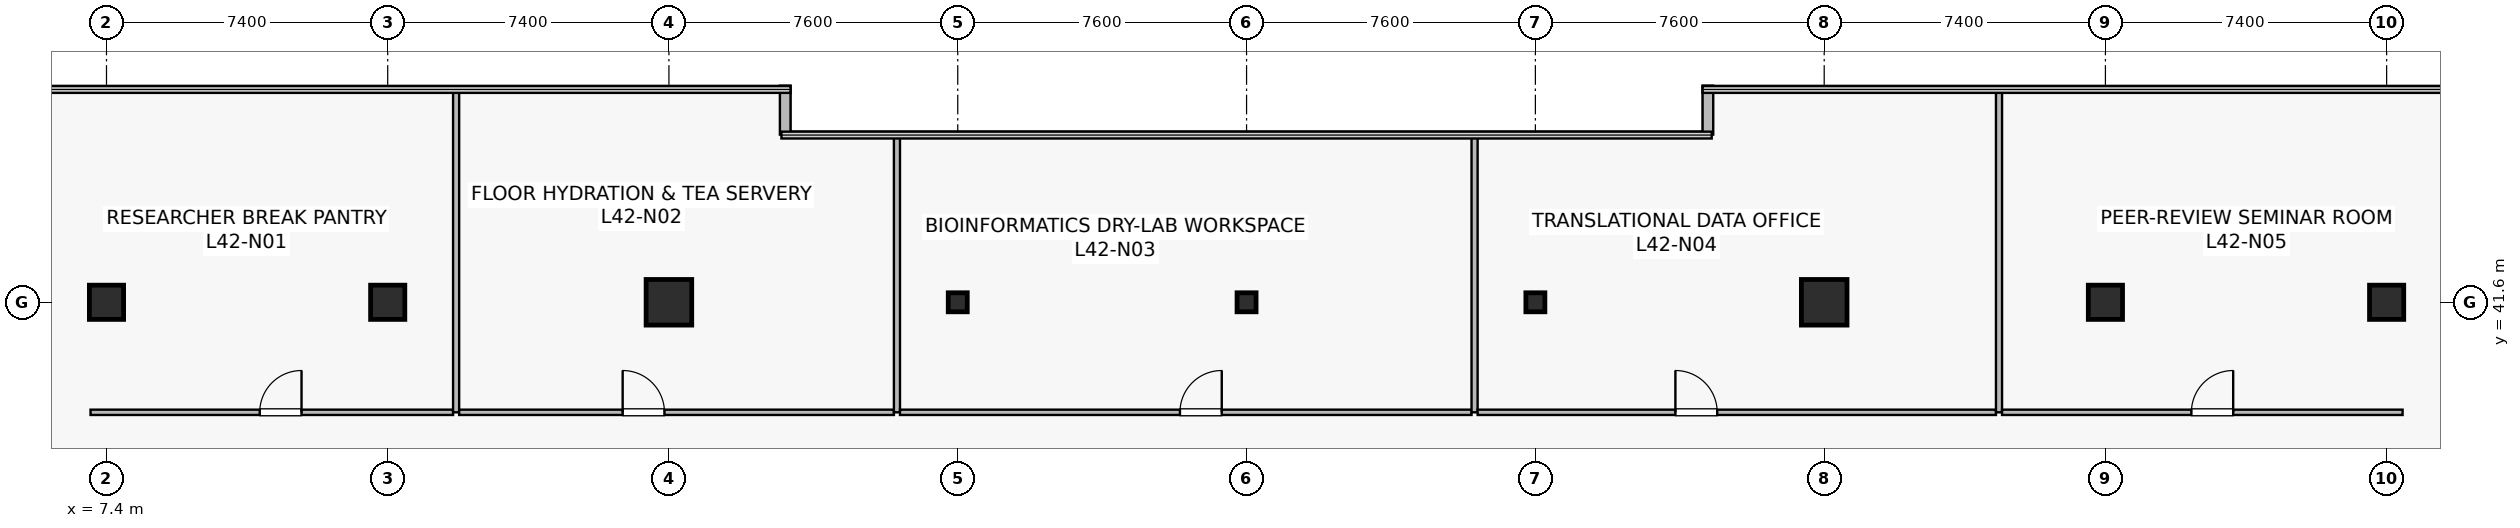
"""IFC4 building model, lengths in metres.
Left out: names, types, materials, properties, quantities, classifications, styles, units other than length and angle.
Written with IfcOpenShell. Run it as: python <this file> out.ifc"""

import sys

from ifc_helpers import new_model, si_unit, direction, frame, frame_2d, origin, origin_2d, place, context, subcontext, project, spatial, rectangle, hollow_rectangle, extrude, source, transform, mapped, element, fill, save


model = new_model("IFC4")
c1 = context("Model", 3, precision=1e-05, world=origin(), true_north=direction((0.0, 1.0)))
c2 = subcontext(c1, "Body", "Model", "MODEL_VIEW")
j1 = project(units=[si_unit("LENGTHUNIT", "METRE"), si_unit("PLANEANGLEUNIT", "RADIAN")], contexts=[c1])
p1 = place(None, origin())
s1 = spatial("IfcSite", under=j1, at=p1, CompositionType="ELEMENT")
p2 = place(p1, origin())
s2 = spatial("IfcBuilding", under=s1, at=p2, CompositionType="ELEMENT")
p3 = place(p2, frame((0.0, 0.0, 174.8)))
s3 = spatial("IfcBuildingStorey", under=s2, at=p3, CompositionType="ELEMENT", Elevation=174.8)
m1 = source(origin(), c2, "Body", "SweptSolid", [
    extrude(rectangle(XDim=0.9, YDim=0.9, at=origin_2d()), origin(), (0.0, 0.0, 1.0), 4.1),
])
p4 = place(p3, frame((14.8, 41.6, 0.0), z_axis=(0.0, 0.0, 1.0), x_axis=(1.0, 0.0, 0.0)))
e1 = element("IfcColumn", 1, at=p4, inside=s3, PredefinedType="COLUMN", context=c2, shape_type="MappedRepresentation", body=[
    mapped(m1, transform((0.0, 0.0, 0.0), scale=1.0)),
])
m2 = source(origin(), c2, "Body", "SweptSolid", [
    extrude(rectangle(XDim=1.2, YDim=1.2, at=origin_2d()), origin(), (0.0, 0.0, 1.0), 4.1),
])
for number, where, z_axis, x_axis in (
    (2, (22.2, 41.6, 0.0), (0.0, 0.0, 1.0), (1.0, 0.0, 0.0)),
    (3, (52.6, 41.6, 0.0), (0.0, 0.0, 1.0), (1.0, 0.0, 0.0)),
):
    element("IfcColumn", number, at=place(p3, frame(where, z_axis=z_axis, x_axis=x_axis)), inside=s3, PredefinedType="COLUMN", context=c2, shape_type="MappedRepresentation", body=[
        mapped(m2, transform((0.0, 0.0, 0.0), scale=1.0)),
    ])
for number, where, z_axis, x_axis in (
    (4, (60.0, 41.6, 0.0), (0.0, 0.0, 1.0), (1.0, 0.0, 0.0)),
    (5, (7.4, 41.6, 0.0), (0.0, 0.0, 1.0), (1.0, 0.0, 0.0)),
    (6, (67.4, 41.6, 0.0), (0.0, 0.0, 1.0), (1.0, 0.0, 0.0)),
):
    element("IfcColumn", number, at=place(p3, frame(where, z_axis=z_axis, x_axis=x_axis)), inside=s3, PredefinedType="COLUMN", context=c2, shape_type="MappedRepresentation", body=[
        mapped(m1, transform((0.0, 0.0, 0.0), scale=1.0)),
    ])
m3 = source(origin(), c2, "Body", "SweptSolid", [
    extrude(hollow_rectangle(XDim=0.5, YDim=0.5, WallThickness=0.022, at=origin_2d()), origin(), (0.0, 0.0, 1.0), 4.1),
])
for number, where, z_axis, x_axis in (
    (7, (29.8, 41.6, 0.0), (0.0, 0.0, 1.0), (1.0, 0.0, 0.0)),
    (8, (37.4, 41.6, 0.0), (0.0, 0.0, 1.0), (1.0, 0.0, 0.0)),
    (9, (45.0, 41.6, 0.0), (0.0, 0.0, 1.0), (1.0, 0.0, 0.0)),
):
    element("IfcColumn", number, at=place(p3, frame(where, z_axis=z_axis, x_axis=x_axis)), inside=s3, PredefinedType="COLUMN", context=c2, shape_type="MappedRepresentation", body=[
        mapped(m3, transform((0.0, 0.0, 0.0), scale=1.0)),
    ])
for number, where, z_axis, x_axis in (
    (10, (49.54, 47.3, 0.0), (0.0, 0.0, 1.0), (0.0, -1.0, 0.0)),
    (11, (25.26, 46.012, 0.0), (0.0, 0.0, 1.0), (0.0, 1.0, 0.0)),
):
    element("IfcWall", number, at=place(p3, frame(where, z_axis=z_axis, x_axis=x_axis)), inside=s3, PredefinedType="STANDARD", context=c2, shape_type="SweptSolid", body=[
        extrude(rectangle(XDim=1.288, YDim=0.28, at=frame_2d((0.644, 0.0))), origin(), (0.0, 0.0, 1.0), 3.79),
    ])
p5 = place(p3, frame((6.98, 38.705, 0.0), z_axis=(0.0, 0.0, 1.0), x_axis=(1.0, 0.0, 0.0)))
e12 = element("IfcWall", 12, at=p5, inside=s3, PredefinedType="PARTITIONING", context=c2, shape_type="SweptSolid", body=[
    extrude(rectangle(XDim=9.54, YDim=0.14, at=frame_2d((4.77, 0.0))), origin(), (0.0, 0.0, 1.0), 3.187),
])
p6 = place(p5, frame((4.452, 0.0, 0.0)))
e13 = element("IfcOpeningElement", 13, at=p6, cuts=e12, PredefinedType="OPENING", context=c2, shape_type="SweptSolid", body=[
    extrude(rectangle(XDim=1.1, YDim=2.18, at=frame_2d((0.55, 1.09))), frame((0.0, 0.08, 0.0), z_axis=(0.0, -1.0, 0.0), x_axis=(1.0, 0.0, 0.0)), (0.0, 0.0, 1.0), 0.16),
])
p7 = place(p3, frame((16.6, 38.705, 0.0), z_axis=(0.0, 0.0, 1.0), x_axis=(0.0, 1.0, 0.0)))
e14 = element("IfcWall", 14, at=p7, inside=s3, PredefinedType="PARTITIONING", context=c2, shape_type="SweptSolid", body=[
    extrude(rectangle(XDim=8.485, YDim=0.16, at=frame_2d((4.242, 0.0))), origin(), (0.0, 0.0, 1.0), 3.075),
])
p8 = place(p3, frame((16.68, 38.705, 0.0), z_axis=(0.0, 0.0, 1.0), x_axis=(1.0, 0.0, 0.0)))
e15 = element("IfcWall", 15, at=p8, inside=s3, PredefinedType="PARTITIONING", context=c2, shape_type="SweptSolid", body=[
    extrude(rectangle(XDim=11.44, YDim=0.14, at=frame_2d((5.72, 0.0))), origin(), (0.0, 0.0, 1.0), 3.187),
])
p9 = place(p8, frame((4.302, 0.0, 0.0)))
e16 = element("IfcOpeningElement", 16, at=p9, cuts=e15, PredefinedType="OPENING", context=c2, shape_type="SweptSolid", body=[
    extrude(rectangle(XDim=1.1, YDim=2.18, at=frame_2d((0.55, 1.09))), frame((0.0, 0.08, 0.0), z_axis=(0.0, -1.0, 0.0), x_axis=(1.0, 0.0, 0.0)), (0.0, 0.0, 1.0), 0.16),
])
p10 = place(p3, frame((28.2, 38.705, 0.0), z_axis=(0.0, 0.0, 1.0), x_axis=(0.0, 1.0, 0.0)))
e17 = element("IfcWall", 17, at=p10, inside=s3, PredefinedType="PARTITIONING", context=c2, shape_type="SweptSolid", body=[
    extrude(rectangle(XDim=7.285, YDim=0.16, at=frame_2d((3.643, 0.0))), origin(), (0.0, 0.0, 1.0), 3.075),
])
p11 = place(p3, frame((28.28, 38.705, 0.0), z_axis=(0.0, 0.0, 1.0), x_axis=(1.0, 0.0, 0.0)))
e18 = element("IfcWall", 18, at=p11, inside=s3, PredefinedType="PARTITIONING", context=c2, shape_type="SweptSolid", body=[
    extrude(rectangle(XDim=15.04, YDim=0.14, at=frame_2d((7.52, 0.0))), origin(), (0.0, 0.0, 1.0), 3.187),
])
p12 = place(p11, frame((7.367, 0.0, 0.0)))
e19 = element("IfcOpeningElement", 19, at=p12, cuts=e18, PredefinedType="OPENING", context=c2, shape_type="SweptSolid", body=[
    extrude(rectangle(XDim=1.1, YDim=2.18, at=frame_2d((0.55, 1.09))), frame((0.0, 0.08, 0.0), z_axis=(0.0, -1.0, 0.0), x_axis=(1.0, 0.0, 0.0)), (0.0, 0.0, 1.0), 0.16),
])
p13 = place(p3, frame((43.4, 38.705, 0.0), z_axis=(0.0, 0.0, 1.0), x_axis=(0.0, 1.0, 0.0)))
e20 = element("IfcWall", 20, at=p13, inside=s3, PredefinedType="PARTITIONING", context=c2, shape_type="SweptSolid", body=[
    extrude(rectangle(XDim=7.285, YDim=0.16, at=frame_2d((3.643, 0.0))), origin(), (0.0, 0.0, 1.0), 3.075),
])
p14 = place(p3, frame((43.48, 38.705, 0.0), z_axis=(0.0, 0.0, 1.0), x_axis=(1.0, 0.0, 0.0)))
e21 = element("IfcWall", 21, at=p14, inside=s3, PredefinedType="PARTITIONING", context=c2, shape_type="SweptSolid", body=[
    extrude(rectangle(XDim=13.64, YDim=0.14, at=frame_2d((6.82, 0.0))), origin(), (0.0, 0.0, 1.0), 3.187),
])
p15 = place(p14, frame((5.204, 0.0, 0.0)))
e22 = element("IfcOpeningElement", 22, at=p15, cuts=e21, PredefinedType="OPENING", context=c2, shape_type="SweptSolid", body=[
    extrude(rectangle(XDim=1.1, YDim=2.18, at=frame_2d((0.55, 1.09))), frame((0.0, 0.08, 0.0), z_axis=(0.0, -1.0, 0.0), x_axis=(1.0, 0.0, 0.0)), (0.0, 0.0, 1.0), 0.16),
])
p16 = place(p3, frame((57.2, 38.705, 0.0), z_axis=(0.0, 0.0, 1.0), x_axis=(0.0, 1.0, 0.0)))
e23 = element("IfcWall", 23, at=p16, inside=s3, PredefinedType="PARTITIONING", context=c2, shape_type="SweptSolid", body=[
    extrude(rectangle(XDim=8.485, YDim=0.16, at=frame_2d((4.242, 0.0))), origin(), (0.0, 0.0, 1.0), 3.075),
])
p17 = place(p3, frame((57.28, 38.705, 0.0), z_axis=(0.0, 0.0, 1.0), x_axis=(1.0, 0.0, 0.0)))
e24 = element("IfcWall", 24, at=p17, inside=s3, PredefinedType="PARTITIONING", context=c2, shape_type="SweptSolid", body=[
    extrude(rectangle(XDim=10.54, YDim=0.14, at=frame_2d((5.27, 0.0))), origin(), (0.0, 0.0, 1.0), 3.187),
])
p18 = place(p17, frame((4.982, 0.0, 0.0)))
e25 = element("IfcOpeningElement", 25, at=p18, cuts=e24, PredefinedType="OPENING", context=c2, shape_type="SweptSolid", body=[
    extrude(rectangle(XDim=1.1, YDim=2.18, at=frame_2d((0.55, 1.09))), frame((0.0, 0.08, 0.0), z_axis=(0.0, -1.0, 0.0), x_axis=(1.0, 0.0, 0.0)), (0.0, 0.0, 1.0), 0.16),
])
m4 = source(origin(), c2, "Body", "SweptSolid", [
    extrude(rectangle(XDim=1.1, YDim=2.18, at=frame_2d((0.55, 1.09))), frame((0.0, 0.025, 0.0), z_axis=(0.0, -1.0, 0.0), x_axis=(1.0, 0.0, 0.0)), (0.0, 0.0, 1.0), 0.05),
])
p19 = place(p6, origin())
e26 = element("IfcDoor", 26, at=p19, inside=s3, OperationType="SINGLE_SWING_RIGHT", PredefinedType="DOOR", context=c2, shape_type="MappedRepresentation", body=[
    mapped(m4, transform((0.0, 0.0, 0.0), scale=1.0)),
])
fill(e13, e26)
p20 = place(p9, origin())
e27 = element("IfcDoor", 27, at=p20, inside=s3, OperationType="SINGLE_SWING_LEFT", PredefinedType="DOOR", context=c2, shape_type="MappedRepresentation", body=[
    mapped(m4, transform((0.0, 0.0, 0.0), scale=1.0)),
])
fill(e16, e27)
p21 = place(p12, origin())
e28 = element("IfcDoor", 28, at=p21, inside=s3, OperationType="SINGLE_SWING_RIGHT", PredefinedType="DOOR", context=c2, shape_type="MappedRepresentation", body=[
    mapped(m4, transform((0.0, 0.0, 0.0), scale=1.0)),
])
fill(e19, e28)
p22 = place(p15, origin())
e29 = element("IfcDoor", 29, at=p22, inside=s3, OperationType="SINGLE_SWING_LEFT", PredefinedType="DOOR", context=c2, shape_type="MappedRepresentation", body=[
    mapped(m4, transform((0.0, 0.0, 0.0), scale=1.0)),
])
fill(e22, e29)
p23 = place(p18, origin())
e30 = element("IfcDoor", 30, at=p23, inside=s3, OperationType="SINGLE_SWING_RIGHT", PredefinedType="DOOR", context=c2, shape_type="MappedRepresentation", body=[
    mapped(m4, transform((0.0, 0.0, 0.0), scale=1.0)),
])
fill(e25, e30)
save(model, sys.argv[1])
